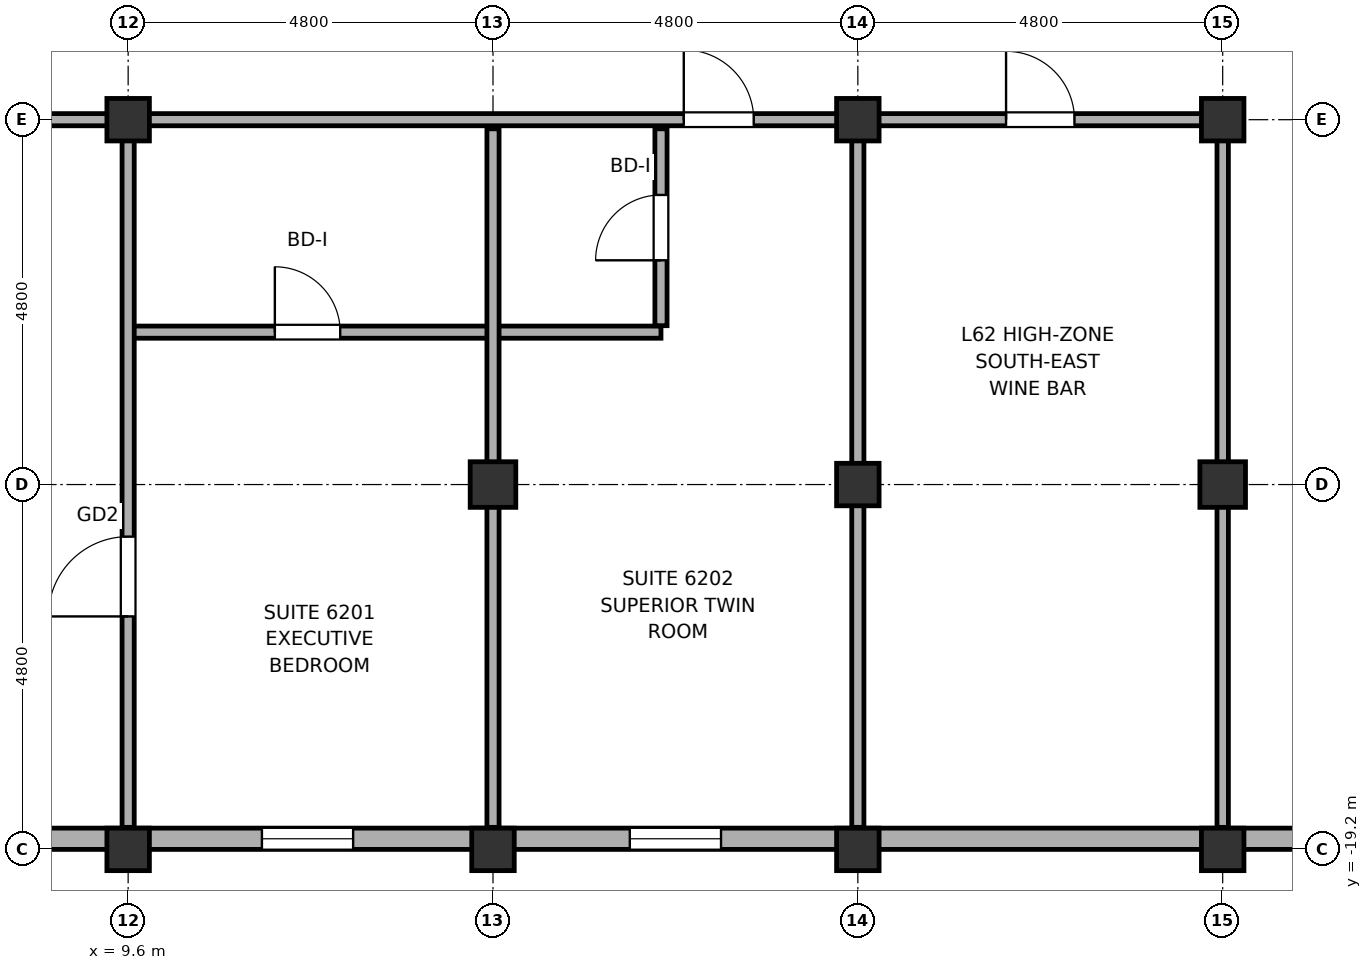
"""IFC4 building model, lengths in metres.
Left out: names, types, materials, properties, quantities, classifications, styles, units other than length and angle.
Written with IfcOpenShell. Run it as: python <this file> out.ifc"""

import sys

from ifc_helpers import new_model, si_unit, direction, frame, frame_2d, origin, origin_2d, place, context, subcontext, project, spatial, rectangle, hollow_rectangle, hollow_circle, extrude, element, fill, save


model = new_model("IFC4")
c1 = context("Model", 3, precision=1e-05, world=origin(), true_north=direction((0.0, 1.0)))
c2 = subcontext(c1, "Body", "Model", "MODEL_VIEW")
j1 = project(units=[si_unit("LENGTHUNIT", "METRE"), si_unit("PLANEANGLEUNIT", "RADIAN")], contexts=[c1])
p1 = place(None, origin())
s1 = spatial("IfcSite", under=j1, at=p1, CompositionType="ELEMENT")
p2 = place(p1, origin())
s2 = spatial("IfcBuilding", under=s1, at=p2, CompositionType="ELEMENT")
p3 = place(p2, frame((0.0, 0.0, 249.25)))
s3 = spatial("IfcBuildingStorey", under=s2, at=p3, CompositionType="ELEMENT", Elevation=249.25)
for number, where, z_axis, x_axis in (
    (1, (9.6, -19.2, 0.0), (0.0, 0.0, 1.0), (1.0, 0.0, 0.0)),
    (2, (9.6, -9.6, 0.0), (0.0, 0.0, 1.0), (1.0, 0.0, 0.0)),
    (3, (14.4, -19.2, 0.0), (0.0, 0.0, 1.0), (1.0, 0.0, 0.0)),
):
    element("IfcColumn", number, at=place(p3, frame(where, z_axis=z_axis, x_axis=x_axis)), inside=s3, PredefinedType="COLUMN", context=c2, shape_type="SweptSolid", body=[
        extrude(hollow_circle(Radius=0.28, WallThickness=0.025, at=origin_2d()), origin(), (0.0, 0.0, 1.0), 3.85),
    ])
p4 = place(p3, frame((14.4, -14.4, 0.0), z_axis=(0.0, 0.0, 1.0), x_axis=(1.0, 0.0, 0.0)))
e4 = element("IfcColumn", 4, at=p4, inside=s3, PredefinedType="COLUMN", context=c2, shape_type="SweptSolid", body=[
    extrude(hollow_rectangle(XDim=0.6, YDim=0.6, WallThickness=0.028, at=origin_2d()), origin(), (0.0, 0.0, 1.0), 3.85),
])
for number, where, z_axis, x_axis in (
    (5, (19.2, -19.2, 0.0), (0.0, 0.0, 1.0), (1.0, 0.0, 0.0)),
    (6, (19.2, -14.4, 0.0), (0.0, 0.0, 1.0), (1.0, 0.0, 0.0)),
    (7, (19.2, -9.6, 0.0), (0.0, 0.0, 1.0), (1.0, 0.0, 0.0)),
    (8, (24.0, -19.2, 0.0), (0.0, 0.0, 1.0), (1.0, 0.0, 0.0)),
):
    element("IfcColumn", number, at=place(p3, frame(where, z_axis=z_axis, x_axis=x_axis)), inside=s3, PredefinedType="COLUMN", context=c2, shape_type="SweptSolid", body=[
        extrude(hollow_circle(Radius=0.28, WallThickness=0.025, at=origin_2d()), origin(), (0.0, 0.0, 1.0), 3.85),
    ])
p5 = place(p3, frame((24.0, -14.4, 0.0), z_axis=(0.0, 0.0, 1.0), x_axis=(1.0, 0.0, 0.0)))
e9 = element("IfcColumn", 9, at=p5, inside=s3, PredefinedType="COLUMN", context=c2, shape_type="SweptSolid", body=[
    extrude(hollow_rectangle(XDim=0.6, YDim=0.6, WallThickness=0.028, at=origin_2d()), origin(), (0.0, 0.0, 1.0), 3.85),
])
p6 = place(p3, frame((24.0, -9.6, 0.0), z_axis=(0.0, 0.0, 1.0), x_axis=(1.0, 0.0, 0.0)))
e10 = element("IfcColumn", 10, at=p6, inside=s3, PredefinedType="COLUMN", context=c2, shape_type="SweptSolid", body=[
    extrude(hollow_circle(Radius=0.28, WallThickness=0.025, at=origin_2d()), origin(), (0.0, 0.0, 1.0), 3.85),
])
p7 = place(p3, frame((4.75, -19.06, 0.0), z_axis=(0.0, 0.0, 1.0), x_axis=(1.0, 0.0, 0.0)))
e11 = element("IfcWall", 11, at=p7, inside=s3, PredefinedType="SOLIDWALL", context=c2, shape_type="SweptSolid", body=[
    extrude(rectangle(XDim=20.45, YDim=0.28, at=frame_2d((10.225, 0.0))), origin(), (0.0, 0.0, 1.0), 2.27),
])
p8 = place(p7, frame((1.89, 0.0, 0.75)))
e12 = element("IfcOpeningElement", 12, at=p8, cuts=e11, PredefinedType="OPENING", context=c2, shape_type="SweptSolid", body=[
    extrude(rectangle(XDim=1.2, YDim=1.15, at=frame_2d((0.6, 0.575))), frame((0.0, 0.155, 0.0), z_axis=(0.0, -1.0, 0.0), x_axis=(1.0, 0.0, 0.0)), (0.0, 0.0, 1.0), 0.31),
])
p9 = place(p7, frame((6.61, 0.0, 0.75)))
e13 = element("IfcOpeningElement", 13, at=p9, cuts=e11, PredefinedType="OPENING", context=c2, shape_type="SweptSolid", body=[
    extrude(rectangle(XDim=1.2, YDim=1.15, at=frame_2d((0.6, 0.575))), frame((0.0, 0.155, 0.0), z_axis=(0.0, -1.0, 0.0), x_axis=(1.0, 0.0, 0.0)), (0.0, 0.0, 1.0), 0.31),
])
p10 = place(p7, frame((11.45, 0.0, 0.75)))
e14 = element("IfcOpeningElement", 14, at=p10, cuts=e11, PredefinedType="OPENING", context=c2, shape_type="SweptSolid", body=[
    extrude(rectangle(XDim=1.2, YDim=1.15, at=frame_2d((0.6, 0.575))), frame((0.0, 0.155, 0.0), z_axis=(0.0, -1.0, 0.0), x_axis=(1.0, 0.0, 0.0)), (0.0, 0.0, 1.0), 0.31),
])
p11 = place(p3, frame((9.6, -12.395, 0.0), z_axis=(0.0, 0.0, 1.0), x_axis=(1.0, 0.0, 0.0)))
e15 = element("IfcWall", 15, at=p11, inside=s3, PredefinedType="PARTITIONING", context=c2, shape_type="SweptSolid", body=[
    extrude(rectangle(XDim=7.01, YDim=0.16, at=frame_2d((3.505, 0.0))), origin(), (0.0, 0.0, 1.0), 3.12),
])
p12 = place(p11, frame((1.93, 0.0, 0.0)))
e16 = element("IfcOpeningElement", 16, at=p12, cuts=e15, PredefinedType="OPENING", context=c2, shape_type="SweptSolid", body=[
    extrude(rectangle(XDim=0.86, YDim=2.1, at=frame_2d((0.43, 1.05))), frame((0.0, 0.095, 0.0), z_axis=(0.0, -1.0, 0.0), x_axis=(1.0, 0.0, 0.0)), (0.0, 0.0, 1.0), 0.19),
])
p13 = place(p3, frame((-23.92, -9.6, 0.0), z_axis=(0.0, 0.0, 1.0), x_axis=(1.0, 0.0, 0.0)))
e17 = element("IfcWall", 17, at=p13, inside=s3, PredefinedType="PARTITIONING", context=c2, shape_type="SweptSolid", body=[
    extrude(rectangle(XDim=47.84, YDim=0.16, at=frame_2d((23.92, 0.0))), origin(), (0.0, 0.0, 1.0), 2.27),
])
p14 = place(p13, frame((1.87, 0.0, 0.0)))
e18 = element("IfcOpeningElement", 18, at=p14, cuts=e17, PredefinedType="OPENING", context=c2, shape_type="SweptSolid", body=[
    extrude(rectangle(XDim=0.9, YDim=2.1, at=frame_2d((0.45, 1.05))), frame((0.0, 0.095, 0.0), z_axis=(0.0, -1.0, 0.0), x_axis=(1.0, 0.0, 0.0)), (0.0, 0.0, 1.0), 0.19),
])
p15 = place(p13, frame((45.07, 0.0, 0.0)))
e19 = element("IfcOpeningElement", 19, at=p15, cuts=e17, PredefinedType="OPENING", context=c2, shape_type="SweptSolid", body=[
    extrude(rectangle(XDim=0.9, YDim=2.1, at=frame_2d((0.45, 1.05))), frame((0.0, 0.095, 0.0), z_axis=(0.0, -1.0, 0.0), x_axis=(1.0, 0.0, 0.0)), (0.0, 0.0, 1.0), 0.19),
])
p16 = place(p13, frame((6.67, 0.0, 0.0)))
e20 = element("IfcOpeningElement", 20, at=p16, cuts=e17, PredefinedType="OPENING", context=c2, shape_type="SweptSolid", body=[
    extrude(rectangle(XDim=0.9, YDim=2.1, at=frame_2d((0.45, 1.05))), frame((0.0, 0.095, 0.0), z_axis=(0.0, -1.0, 0.0), x_axis=(1.0, 0.0, 0.0)), (0.0, 0.0, 1.0), 0.19),
])
p17 = place(p13, frame((11.47, 0.0, 0.0)))
e21 = element("IfcOpeningElement", 21, at=p17, cuts=e17, PredefinedType="OPENING", context=c2, shape_type="SweptSolid", body=[
    extrude(rectangle(XDim=0.9, YDim=2.1, at=frame_2d((0.45, 1.05))), frame((0.0, 0.095, 0.0), z_axis=(0.0, -1.0, 0.0), x_axis=(1.0, 0.0, 0.0)), (0.0, 0.0, 1.0), 0.19),
])
p18 = place(p13, frame((16.27, 0.0, 0.0)))
e22 = element("IfcOpeningElement", 22, at=p18, cuts=e17, PredefinedType="OPENING", context=c2, shape_type="SweptSolid", body=[
    extrude(rectangle(XDim=0.9, YDim=2.1, at=frame_2d((0.45, 1.05))), frame((0.0, 0.095, 0.0), z_axis=(0.0, -1.0, 0.0), x_axis=(1.0, 0.0, 0.0)), (0.0, 0.0, 1.0), 0.19),
])
p19 = place(p13, frame((21.07, 0.0, 0.0)))
e23 = element("IfcOpeningElement", 23, at=p19, cuts=e17, PredefinedType="OPENING", context=c2, shape_type="SweptSolid", body=[
    extrude(rectangle(XDim=0.9, YDim=2.1, at=frame_2d((0.45, 1.05))), frame((0.0, 0.095, 0.0), z_axis=(0.0, -1.0, 0.0), x_axis=(1.0, 0.0, 0.0)), (0.0, 0.0, 1.0), 0.19),
])
p20 = place(p13, frame((25.87, 0.0, 0.0)))
e24 = element("IfcOpeningElement", 24, at=p20, cuts=e17, PredefinedType="OPENING", context=c2, shape_type="SweptSolid", body=[
    extrude(rectangle(XDim=0.9, YDim=2.1, at=frame_2d((0.45, 1.05))), frame((0.0, 0.095, 0.0), z_axis=(0.0, -1.0, 0.0), x_axis=(1.0, 0.0, 0.0)), (0.0, 0.0, 1.0), 0.19),
])
p21 = place(p13, frame((30.635, 0.0, 0.0)))
e25 = element("IfcOpeningElement", 25, at=p21, cuts=e17, PredefinedType="OPENING", context=c2, shape_type="SweptSolid", body=[
    extrude(rectangle(XDim=1.05, YDim=2.2, at=frame_2d((0.525, 1.1))), frame((0.0, 0.095, 0.0), z_axis=(0.0, -1.0, 0.0), x_axis=(1.0, 0.0, 0.0)), (0.0, 0.0, 1.0), 0.19),
])
p22 = place(p13, frame((40.83, 0.0, 0.0)))
e26 = element("IfcOpeningElement", 26, at=p22, cuts=e17, PredefinedType="OPENING", context=c2, shape_type="SweptSolid", body=[
    extrude(rectangle(XDim=0.92, YDim=2.15, at=frame_2d((0.46, 1.075))), frame((0.0, 0.095, 0.0), z_axis=(0.0, -1.0, 0.0), x_axis=(1.0, 0.0, 0.0)), (0.0, 0.0, 1.0), 0.19),
])
p23 = place(p3, frame((9.6, -18.91, 0.0), z_axis=(0.0, 0.0, 1.0), x_axis=(0.0, 1.0, 0.0)))
e27 = element("IfcWall", 27, at=p23, inside=s3, PredefinedType="PARTITIONING", context=c2, shape_type="SweptSolid", body=[
    extrude(rectangle(XDim=9.19, YDim=0.16, at=frame_2d((4.595, 0.0))), origin(), (0.0, 0.0, 1.0), 2.27),
])
p24 = place(p23, frame((2.775, 0.0, 0.0)))
e28 = element("IfcOpeningElement", 28, at=p24, cuts=e27, PredefinedType="OPENING", context=c2, shape_type="SweptSolid", body=[
    extrude(rectangle(XDim=1.05, YDim=2.2, at=frame_2d((0.525, 1.1))), frame((0.0, 0.095, 0.0), z_axis=(0.0, -1.0, 0.0), x_axis=(1.0, 0.0, 0.0)), (0.0, 0.0, 1.0), 0.19),
])
p25 = place(p3, frame((14.4, -18.91, 0.0), z_axis=(0.0, 0.0, 1.0), x_axis=(0.0, 1.0, 0.0)))
e29 = element("IfcWall", 29, at=p25, inside=s3, PredefinedType="PARTITIONING", context=c2, shape_type="SweptSolid", body=[
    extrude(rectangle(XDim=9.19, YDim=0.16, at=frame_2d((4.595, 0.0))), origin(), (0.0, 0.0, 1.0), 2.27),
])
p26 = place(p3, frame((16.61, -12.31, 0.0), z_axis=(0.0, 0.0, 1.0), x_axis=(0.0, 1.0, 0.0)))
e30 = element("IfcWall", 30, at=p26, inside=s3, PredefinedType="PARTITIONING", context=c2, shape_type="SweptSolid", body=[
    extrude(rectangle(XDim=2.59, YDim=0.16, at=frame_2d((1.295, 0.0))), origin(), (0.0, 0.0, 1.0), 2.27),
])
p27 = place(p26, frame((0.86, 0.0, 0.0)))
e31 = element("IfcOpeningElement", 31, at=p27, cuts=e30, PredefinedType="OPENING", context=c2, shape_type="SweptSolid", body=[
    extrude(rectangle(XDim=0.86, YDim=2.1, at=frame_2d((0.43, 1.05))), frame((0.0, 0.095, 0.0), z_axis=(0.0, -1.0, 0.0), x_axis=(1.0, 0.0, 0.0)), (0.0, 0.0, 1.0), 0.19),
])
p28 = place(p3, frame((19.2, -18.91, 0.0), z_axis=(0.0, 0.0, 1.0), x_axis=(0.0, 1.0, 0.0)))
e32 = element("IfcWall", 32, at=p28, inside=s3, PredefinedType="PARTITIONING", context=c2, shape_type="SweptSolid", body=[
    extrude(rectangle(XDim=9.19, YDim=0.16, at=frame_2d((4.595, 0.0))), origin(), (0.0, 0.0, 1.0), 2.27),
])
p29 = place(p3, frame((24.0, -18.91, 0.0), z_axis=(0.0, 0.0, 1.0), x_axis=(0.0, 1.0, 0.0)))
e33 = element("IfcWall", 33, at=p29, inside=s3, PredefinedType="PARTITIONING", context=c2, shape_type="SweptSolid", body=[
    extrude(rectangle(XDim=9.19, YDim=0.15, at=frame_2d((4.595, 0.0))), origin(), (0.0, 0.0, 1.0), 2.27),
])
p30 = place(p9, origin())
e34 = element("IfcWindow", 34, at=p30, inside=s3, PartitioningType="SINGLE_PANEL", PredefinedType="WINDOW", context=c2, shape_type="SweptSolid", body=[
    extrude(rectangle(XDim=1.2, YDim=1.15, at=frame_2d((0.6, 0.575))), frame((0.0, 0.03, 0.0), z_axis=(0.0, -1.0, 0.0), x_axis=(1.0, 0.0, 0.0)), (0.0, 0.0, 1.0), 0.06),
])
fill(e13, e34)
p31 = place(p10, origin())
e35 = element("IfcWindow", 35, at=p31, inside=s3, PartitioningType="SINGLE_PANEL", PredefinedType="WINDOW", context=c2, shape_type="SweptSolid", body=[
    extrude(rectangle(XDim=1.2, YDim=1.15, at=frame_2d((0.6, 0.575))), frame((0.0, 0.03, 0.0), z_axis=(0.0, -1.0, 0.0), x_axis=(1.0, 0.0, 0.0)), (0.0, 0.0, 1.0), 0.06),
])
fill(e14, e35)
p32 = place(p15, origin())
e36 = element("IfcDoor", 36, at=p32, inside=s3, OperationType="SINGLE_SWING_LEFT", PredefinedType="DOOR", context=c2, shape_type="SweptSolid", body=[
    extrude(rectangle(XDim=0.9, YDim=2.1, at=frame_2d((0.45, 1.05))), frame((0.0, 0.025, 0.0), z_axis=(0.0, -1.0, 0.0), x_axis=(1.0, 0.0, 0.0)), (0.0, 0.0, 1.0), 0.05),
])
fill(e19, e36)
p33 = place(p24, origin())
e37 = element("IfcDoor", 37, at=p33, inside=s3, OperationType="SINGLE_SWING_LEFT", PredefinedType="DOOR", context=c2, shape_type="SweptSolid", body=[
    extrude(rectangle(XDim=1.05, YDim=2.2, at=frame_2d((0.525, 1.1))), frame((0.0, 0.025, 0.0), z_axis=(0.0, -1.0, 0.0), x_axis=(1.0, 0.0, 0.0)), (0.0, 0.0, 1.0), 0.05),
])
fill(e28, e37)
p34 = place(p12, origin())
e38 = element("IfcDoor", 38, at=p34, inside=s3, OperationType="SINGLE_SWING_LEFT", PredefinedType="DOOR", context=c2, shape_type="SweptSolid", body=[
    extrude(rectangle(XDim=0.86, YDim=2.1, at=frame_2d((0.43, 1.05))), frame((0.0, 0.025, 0.0), z_axis=(0.0, -1.0, 0.0), x_axis=(1.0, 0.0, 0.0)), (0.0, 0.0, 1.0), 0.05),
])
fill(e16, e38)
p35 = place(p22, origin())
e39 = element("IfcDoor", 39, at=p35, inside=s3, OperationType="SINGLE_SWING_RIGHT", PredefinedType="DOOR", context=c2, shape_type="SweptSolid", body=[
    extrude(rectangle(XDim=0.92, YDim=2.15, at=frame_2d((0.46, 1.075))), frame((0.0, 0.025, 0.0), z_axis=(0.0, -1.0, 0.0), x_axis=(1.0, 0.0, 0.0)), (0.0, 0.0, 1.0), 0.05),
])
fill(e26, e39)
p36 = place(p27, origin())
e40 = element("IfcDoor", 40, at=p36, inside=s3, OperationType="SINGLE_SWING_RIGHT", PredefinedType="DOOR", context=c2, shape_type="SweptSolid", body=[
    extrude(rectangle(XDim=0.86, YDim=2.1, at=frame_2d((0.43, 1.05))), frame((0.0, 0.025, 0.0), z_axis=(0.0, -1.0, 0.0), x_axis=(1.0, 0.0, 0.0)), (0.0, 0.0, 1.0), 0.05),
])
fill(e31, e40)
save(model, sys.argv[1])
